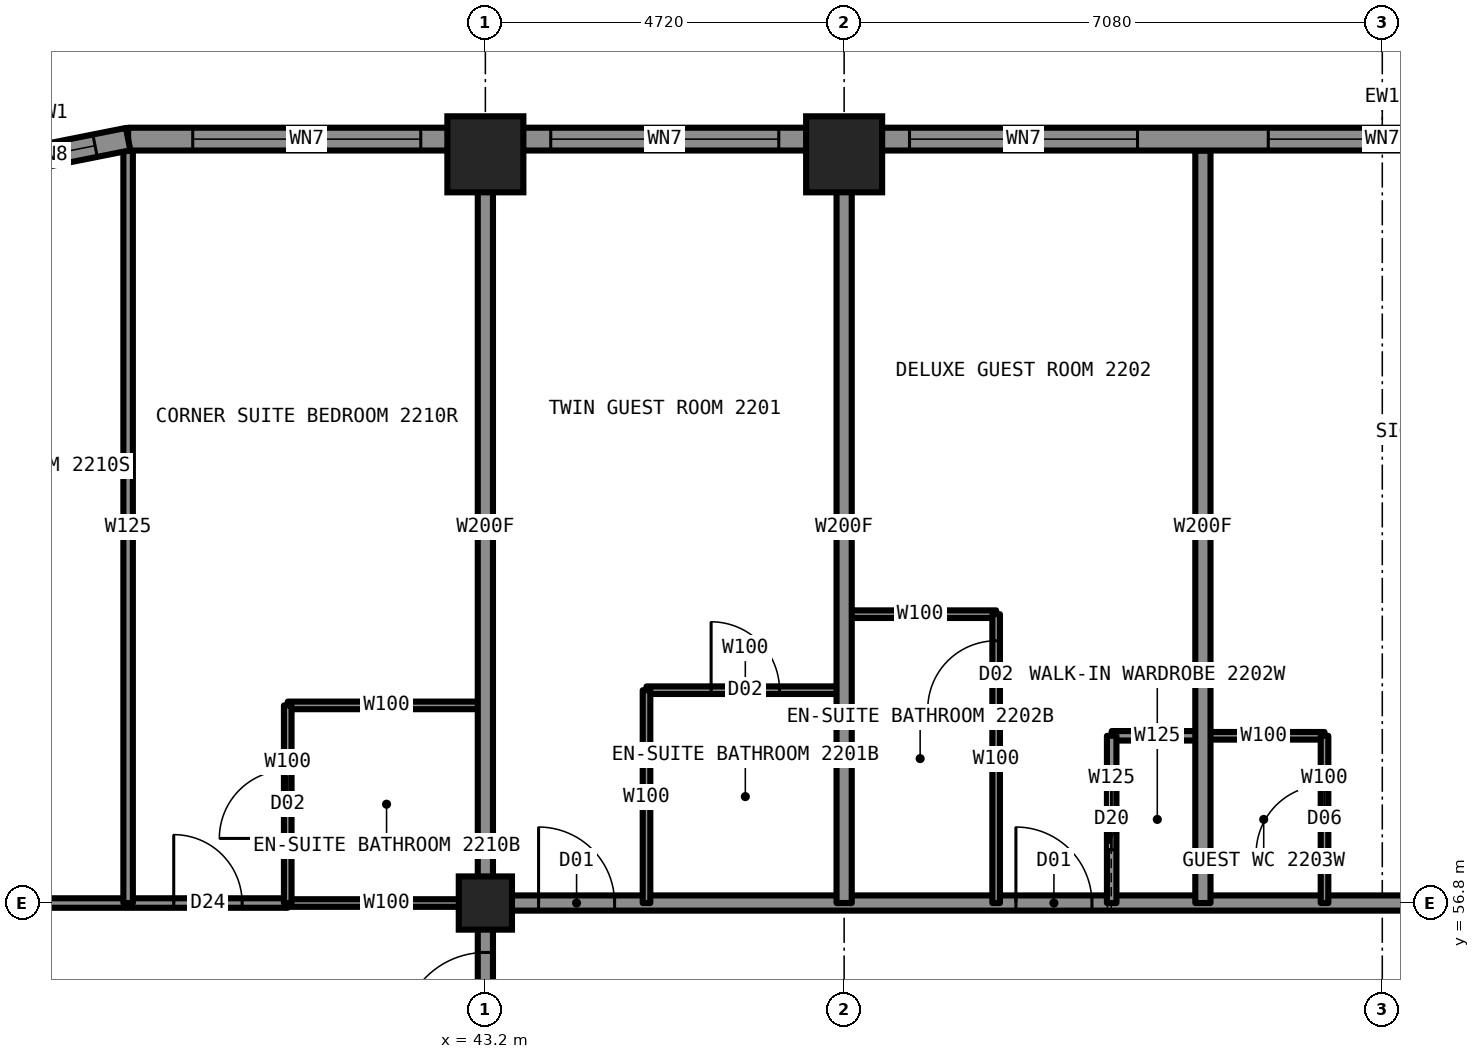
"""IFC4 building model, lengths in metres.
Left out: names, types, materials, properties, quantities, classifications, styles, units other than length and angle.
Written with IfcOpenShell. Run it as: python <this file> out.ifc"""

import sys

from ifc_helpers import new_model, si_unit, direction, frame, frame_2d, origin, origin_2d, place, context, subcontext, project, spatial, rectangle, hollow_rectangle, i_section, extrude, element, fill, save


model = new_model("IFC4")
c1 = context("Model", 3, precision=1e-05, world=origin(), true_north=direction((0.0, 1.0)))
c2 = subcontext(c1, "Body", "Model", "MODEL_VIEW")
j1 = project(units=[si_unit("LENGTHUNIT", "METRE"), si_unit("PLANEANGLEUNIT", "RADIAN")], contexts=[c1])
p1 = place(None, origin())
s1 = spatial("IfcSite", under=j1, at=p1, CompositionType="ELEMENT")
p2 = place(p1, origin())
s2 = spatial("IfcBuilding", under=s1, at=p2, CompositionType="ELEMENT")
p3 = place(p2, frame((0.0, 0.0, 81.0)))
s3 = spatial("IfcBuildingStorey", under=s2, at=p3, CompositionType="ELEMENT", Elevation=81.0)
for number, where, z_axis, x_axis in (
    (1, (43.2, 66.65, 0.0), (0.0, 0.0, 1.0), (1.0, 0.0, 0.0)),
    (2, (47.92, 66.65, 0.0), (0.0, 0.0, 1.0), (1.0, 0.0, 0.0)),
):
    element("IfcColumn", number, at=place(p3, frame(where, z_axis=z_axis, x_axis=x_axis)), inside=s3, PredefinedType="COLUMN", context=c2, shape_type="SweptSolid", body=[
        extrude(i_section(OverallWidth=0.432, OverallDepth=0.498, WebThickness=0.056, FlangeThickness=0.089, at=origin_2d()), origin(), (0.0, 0.0, 1.0), 3.5),
    ])
p4 = place(p3, frame((43.2, 56.8, 0.0), z_axis=(0.0, 0.0, 1.0), x_axis=(1.0, 0.0, 0.0)))
e3 = element("IfcColumn", 3, at=p4, inside=s3, PredefinedType="COLUMN", context=c2, shape_type="SweptSolid", body=[
    extrude(hollow_rectangle(XDim=0.7, YDim=0.7, WallThickness=0.06, at=origin_2d()), origin(), (0.0, 0.0, 1.0), 3.5),
])
p5 = place(p3, frame((40.6, 56.8, 0.0), z_axis=(0.0, 0.0, 1.0), x_axis=(1.0, 0.0, 0.0)))
e4 = element("IfcWall", 4, at=p5, inside=s3, PredefinedType="PARTITIONING", context=c2, shape_type="SweptSolid", body=[
    extrude(rectangle(XDim=2.6, YDim=0.1, at=frame_2d((1.3, 0.0))), origin(), (0.0, 0.0, 1.0), 2.573),
])
p6 = place(p3, frame((43.2, 56.8, 0.0), z_axis=(0.0, 0.0, 1.0), x_axis=(1.0, 0.0, 0.0)))
e5 = element("IfcWall", 5, at=p6, inside=s3, PredefinedType="PARTITIONING", context=c2, shape_type="SweptSolid", body=[
    extrude(rectangle(XDim=23.6, YDim=0.2, at=frame_2d((11.8, 0.0))), origin(), (0.0, 0.0, 1.0), 3.33),
])
p7 = place(p6, frame((0.7, 0.0, 0.0)))
e6 = element("IfcOpeningElement", 6, at=p7, cuts=e5, PredefinedType="OPENING", context=c2, shape_type="SweptSolid", body=[
    extrude(rectangle(XDim=1.0, YDim=2.2, at=frame_2d((0.5, 1.1))), frame((0.0, 0.11, 0.0), z_axis=(0.0, -1.0, 0.0), x_axis=(1.0, 0.0, 0.0)), (0.0, 0.0, 1.0), 0.22),
])
p8 = place(p6, frame((6.98, 0.0, 0.0)))
e7 = element("IfcOpeningElement", 7, at=p8, cuts=e5, PredefinedType="OPENING", context=c2, shape_type="SweptSolid", body=[
    extrude(rectangle(XDim=1.0, YDim=2.2, at=frame_2d((0.5, 1.1))), frame((0.0, 0.11, 0.0), z_axis=(0.0, -1.0, 0.0), x_axis=(1.0, 0.0, 0.0)), (0.0, 0.0, 1.0), 0.22),
])
p9 = place(p6, frame((11.29, 0.0, 0.0)))
e8 = element("IfcOpeningElement", 8, at=p9, cuts=e5, PredefinedType="OPENING", context=c2, shape_type="SweptSolid", body=[
    extrude(rectangle(XDim=1.1, YDim=2.2, at=frame_2d((0.55, 1.1))), frame((0.0, 0.11, 0.0), z_axis=(0.0, -1.0, 0.0), x_axis=(1.0, 0.0, 0.0)), (0.0, 0.0, 1.0), 0.22),
])
p10 = place(p3, frame((33.3, 56.8, 0.0), z_axis=(0.0, 0.0, 1.0), x_axis=(1.0, 0.0, 0.0)))
e9 = element("IfcWall", 9, at=p10, inside=s3, PredefinedType="PARTITIONING", context=c2, shape_type="SweptSolid", body=[
    extrude(rectangle(XDim=7.3, YDim=0.125, at=frame_2d((3.65, 0.0))), origin(), (0.0, 0.0, 1.0), 2.573),
])
p11 = place(p10, frame((5.8, 0.0, 0.0)))
e10 = element("IfcOpeningElement", 10, at=p11, cuts=e9, PredefinedType="OPENING", context=c2, shape_type="SweptSolid", body=[
    extrude(rectangle(XDim=0.9, YDim=2.2, at=frame_2d((0.45, 1.1))), frame((0.0, 0.073, 0.0), z_axis=(0.0, -1.0, 0.0), x_axis=(1.0, 0.0, 0.0)), (0.0, 0.0, 1.0), 0.145),
])
p12 = place(p10, frame((2.0, 0.0, 0.0)))
e11 = element("IfcOpeningElement", 11, at=p12, cuts=e9, PredefinedType="OPENING", context=c2, shape_type="SweptSolid", body=[
    extrude(rectangle(XDim=0.9, YDim=2.2, at=frame_2d((0.45, 1.1))), frame((0.0, 0.073, 0.0), z_axis=(0.0, -1.0, 0.0), x_axis=(1.0, 0.0, 0.0)), (0.0, 0.0, 1.0), 0.145),
])
p13 = place(p3, frame((52.64, 59.0, 0.0), z_axis=(0.0, 0.0, 1.0), x_axis=(1.0, 0.0, 0.0)))
e12 = element("IfcWall", 12, at=p13, inside=s3, PredefinedType="PARTITIONING", context=c2, shape_type="SweptSolid", body=[
    extrude(rectangle(XDim=1.6, YDim=0.1, at=frame_2d((0.8, 0.0))), origin(), (0.0, 0.0, 1.0), 3.33),
])
p14 = place(p3, frame((51.44, 59.0, 0.0), z_axis=(0.0, 0.0, 1.0), x_axis=(1.0, 0.0, 0.0)))
e13 = element("IfcWall", 13, at=p14, inside=s3, PredefinedType="PARTITIONING", context=c2, shape_type="SweptSolid", body=[
    extrude(rectangle(XDim=1.2, YDim=0.125, at=frame_2d((0.6, 0.0))), origin(), (0.0, 0.0, 1.0), 3.33),
])
p15 = place(p3, frame((40.6, 59.4, 0.0), z_axis=(0.0, 0.0, 1.0), x_axis=(1.0, 0.0, 0.0)))
e14 = element("IfcWall", 14, at=p15, inside=s3, PredefinedType="PARTITIONING", context=c2, shape_type="SweptSolid", body=[
    extrude(rectangle(XDim=2.6, YDim=0.1, at=frame_2d((1.3, 0.0))), origin(), (0.0, 0.0, 1.0), 3.33),
])
p16 = place(p3, frame((45.32, 59.6, 0.0), z_axis=(0.0, 0.0, 1.0), x_axis=(1.0, 0.0, 0.0)))
e15 = element("IfcWall", 15, at=p16, inside=s3, PredefinedType="PARTITIONING", context=c2, shape_type="SweptSolid", body=[
    extrude(rectangle(XDim=2.6, YDim=0.1, at=frame_2d((1.3, 0.0))), origin(), (0.0, 0.0, 1.0), 3.33),
])
p17 = place(p16, frame((0.85, 0.0, 0.0)))
e16 = element("IfcOpeningElement", 16, at=p17, cuts=e15, PredefinedType="OPENING", context=c2, shape_type="SweptSolid", body=[
    extrude(rectangle(XDim=0.9, YDim=2.1, at=frame_2d((0.45, 1.05))), frame((0.0, 0.06, 0.0), z_axis=(0.0, -1.0, 0.0), x_axis=(1.0, 0.0, 0.0)), (0.0, 0.0, 1.0), 0.12),
])
p18 = place(p3, frame((47.92, 60.6, 0.0), z_axis=(0.0, 0.0, 1.0), x_axis=(1.0, 0.0, 0.0)))
e17 = element("IfcWall", 17, at=p18, inside=s3, PredefinedType="PARTITIONING", context=c2, shape_type="SweptSolid", body=[
    extrude(rectangle(XDim=2.0, YDim=0.1, at=frame_2d((1.0, 0.0))), origin(), (0.0, 0.0, 1.0), 3.33),
])
p19 = place(p3, frame((54.24, 56.8, 0.0), z_axis=(0.0, 0.0, 1.0), x_axis=(0.0, 1.0, 0.0)))
e18 = element("IfcWall", 18, at=p19, inside=s3, PredefinedType="PARTITIONING", context=c2, shape_type="SweptSolid", body=[
    extrude(rectangle(XDim=2.2, YDim=0.1, at=frame_2d((1.1, 0.0))), origin(), (0.0, 0.0, 1.0), 3.33),
])
p20 = place(p19, frame((0.65, 0.0, 0.0)))
e19 = element("IfcOpeningElement", 19, at=p20, cuts=e18, PredefinedType="OPENING", context=c2, shape_type="SweptSolid", body=[
    extrude(rectangle(XDim=0.9, YDim=2.1, at=frame_2d((0.45, 1.05))), frame((0.0, 0.06, 0.0), z_axis=(0.0, -1.0, 0.0), x_axis=(1.0, 0.0, 0.0)), (0.0, 0.0, 1.0), 0.12),
])
p21 = place(p3, frame((43.2, 52.08, 0.0), z_axis=(0.0, 0.0, 1.0), x_axis=(0.0, 1.0, 0.0)))
e20 = element("IfcWall", 20, at=p21, inside=s3, PredefinedType="PARTITIONING", context=c2, shape_type="SweptSolid", body=[
    extrude(rectangle(XDim=4.72, YDim=0.2, at=frame_2d((2.36, 0.0))), origin(), (0.0, 0.0, 1.0), 3.33),
])
p22 = place(p21, frame((2.97, 0.0, 0.0)))
e21 = element("IfcOpeningElement", 21, at=p22, cuts=e20, PredefinedType="OPENING", context=c2, shape_type="SweptSolid", body=[
    extrude(rectangle(XDim=1.1, YDim=2.2, at=frame_2d((0.55, 1.1))), frame((0.0, 0.11, 0.0), z_axis=(0.0, -1.0, 0.0), x_axis=(1.0, 0.0, 0.0)), (0.0, 0.0, 1.0), 0.22),
])
p23 = place(p3, frame((43.2, 56.8, 0.0), z_axis=(0.0, 0.0, 1.0), x_axis=(0.0, 1.0, 0.0)))
e22 = element("IfcWall", 22, at=p23, inside=s3, PredefinedType="PARTITIONING", context=c2, shape_type="SweptSolid", body=[
    extrude(rectangle(XDim=9.9, YDim=0.2, at=frame_2d((4.95, 0.0))), origin(), (0.0, 0.0, 1.0), 2.573),
])
p24 = place(p3, frame((40.6, 56.8, 0.0), z_axis=(0.0, 0.0, 1.0), x_axis=(0.0, 1.0, 0.0)))
e23 = element("IfcWall", 23, at=p24, inside=s3, PredefinedType="PARTITIONING", context=c2, shape_type="SweptSolid", body=[
    extrude(rectangle(XDim=2.6, YDim=0.1, at=frame_2d((1.3, 0.0))), origin(), (0.0, 0.0, 1.0), 3.33),
])
p25 = place(p24, frame((0.85, 0.0, 0.0)))
e24 = element("IfcOpeningElement", 24, at=p25, cuts=e23, PredefinedType="OPENING", context=c2, shape_type="SweptSolid", body=[
    extrude(rectangle(XDim=0.9, YDim=2.1, at=frame_2d((0.45, 1.05))), frame((0.0, 0.06, 0.0), z_axis=(0.0, -1.0, 0.0), x_axis=(1.0, 0.0, 0.0)), (0.0, 0.0, 1.0), 0.12),
])
p26 = place(p3, frame((38.5, 56.8, 0.0), z_axis=(0.0, 0.0, 1.0), x_axis=(0.0, 1.0, 0.0)))
e25 = element("IfcWall", 25, at=p26, inside=s3, PredefinedType="PARTITIONING", context=c2, shape_type="SweptSolid", body=[
    extrude(rectangle(XDim=9.894, YDim=0.125, at=frame_2d((4.947, 0.0))), origin(), (0.0, 0.0, 1.0), 3.33),
])
p27 = place(p3, frame((52.64, 56.8, 0.0), z_axis=(0.0, 0.0, 1.0), x_axis=(0.0, 1.0, 0.0)))
e26 = element("IfcWall", 26, at=p27, inside=s3, PredefinedType="PARTITIONING", context=c2, shape_type="SweptSolid", body=[
    extrude(rectangle(XDim=9.9, YDim=0.2, at=frame_2d((4.95, 0.0))), origin(), (0.0, 0.0, 1.0), 3.33),
])
p28 = place(p3, frame((51.44, 56.8, 0.0), z_axis=(0.0, 0.0, 1.0), x_axis=(0.0, 1.0, 0.0)))
e27 = element("IfcWall", 27, at=p28, inside=s3, PredefinedType="PARTITIONING", context=c2, shape_type="SweptSolid", body=[
    extrude(rectangle(XDim=2.2, YDim=0.125, at=frame_2d((1.1, 0.0))), origin(), (0.0, 0.0, 1.0), 3.33),
])
p29 = place(p28, frame((0.7, 0.0, 0.0)))
e28 = element("IfcOpeningElement", 28, at=p29, cuts=e27, PredefinedType="OPENING", context=c2, shape_type="SweptSolid", body=[
    extrude(rectangle(XDim=0.8, YDim=2.1, at=frame_2d((0.4, 1.05))), frame((0.0, 0.073, 0.0), z_axis=(0.0, -1.0, 0.0), x_axis=(1.0, 0.0, 0.0)), (0.0, 0.0, 1.0), 0.145),
])
p30 = place(p3, frame((49.92, 56.8, 0.0), z_axis=(0.0, 0.0, 1.0), x_axis=(0.0, 1.0, 0.0)))
e29 = element("IfcWall", 29, at=p30, inside=s3, PredefinedType="PARTITIONING", context=c2, shape_type="SweptSolid", body=[
    extrude(rectangle(XDim=3.8, YDim=0.1, at=frame_2d((1.9, 0.0))), origin(), (0.0, 0.0, 1.0), 3.33),
])
p31 = place(p30, frame((2.55, 0.0, 0.0)))
e30 = element("IfcOpeningElement", 30, at=p31, cuts=e29, PredefinedType="OPENING", context=c2, shape_type="SweptSolid", body=[
    extrude(rectangle(XDim=0.9, YDim=2.1, at=frame_2d((0.45, 1.05))), frame((0.0, 0.06, 0.0), z_axis=(0.0, -1.0, 0.0), x_axis=(1.0, 0.0, 0.0)), (0.0, 0.0, 1.0), 0.12),
])
p32 = place(p3, frame((47.92, 56.8, 0.0), z_axis=(0.0, 0.0, 1.0), x_axis=(0.0, 1.0, 0.0)))
e31 = element("IfcWall", 31, at=p32, inside=s3, PredefinedType="PARTITIONING", context=c2, shape_type="SweptSolid", body=[
    extrude(rectangle(XDim=9.9, YDim=0.2, at=frame_2d((4.95, 0.0))), origin(), (0.0, 0.0, 1.0), 2.573),
])
p33 = place(p3, frame((45.32, 56.8, 0.0), z_axis=(0.0, 0.0, 1.0), x_axis=(0.0, 1.0, 0.0)))
e32 = element("IfcWall", 32, at=p33, inside=s3, PredefinedType="PARTITIONING", context=c2, shape_type="SweptSolid", body=[
    extrude(rectangle(XDim=2.8, YDim=0.1, at=frame_2d((1.4, 0.0))), origin(), (0.0, 0.0, 1.0), 3.33),
])
p34 = place(p3, frame((71.5, 66.85, 0.0), z_axis=(0.0, 0.0, 1.0), x_axis=(-1.0, 0.0, 0.0)))
e33 = element("IfcWall", 33, at=p34, inside=s3, PredefinedType="SOLIDWALL", context=c2, shape_type="SweptSolid", body=[
    extrude(rectangle(XDim=33.0, YDim=0.3, at=frame_2d((16.5, 0.0))), origin(), (0.0, 0.0, 1.0), 2.63),
])
p35 = place(p34, frame((0.85, 0.0, 0.5)))
e34 = element("IfcOpeningElement", 34, at=p35, cuts=e33, PredefinedType="OPENING", context=c2, shape_type="SweptSolid", body=[
    extrude(rectangle(XDim=3.0, YDim=2.0, at=frame_2d((1.5, 1.0))), frame((0.0, 0.16, 0.0), z_axis=(0.0, -1.0, 0.0), x_axis=(1.0, 0.0, 0.0)), (0.0, 0.0, 1.0), 0.32),
])
p36 = place(p34, frame((5.56, 0.0, 0.5)))
e35 = element("IfcOpeningElement", 35, at=p36, cuts=e33, PredefinedType="OPENING", context=c2, shape_type="SweptSolid", body=[
    extrude(rectangle(XDim=3.0, YDim=2.0, at=frame_2d((1.5, 1.0))), frame((0.0, 0.16, 0.0), z_axis=(0.0, -1.0, 0.0), x_axis=(1.0, 0.0, 0.0)), (0.0, 0.0, 1.0), 0.32),
])
p37 = place(p34, frame((10.28, 0.0, 0.5)))
e36 = element("IfcOpeningElement", 36, at=p37, cuts=e33, PredefinedType="OPENING", context=c2, shape_type="SweptSolid", body=[
    extrude(rectangle(XDim=3.0, YDim=2.0, at=frame_2d((1.5, 1.0))), frame((0.0, 0.16, 0.0), z_axis=(0.0, -1.0, 0.0), x_axis=(1.0, 0.0, 0.0)), (0.0, 0.0, 1.0), 0.32),
])
p38 = place(p34, frame((15.0, 0.0, 0.5)))
e37 = element("IfcOpeningElement", 37, at=p38, cuts=e33, PredefinedType="OPENING", context=c2, shape_type="SweptSolid", body=[
    extrude(rectangle(XDim=3.0, YDim=2.0, at=frame_2d((1.5, 1.0))), frame((0.0, 0.16, 0.0), z_axis=(0.0, -1.0, 0.0), x_axis=(1.0, 0.0, 0.0)), (0.0, 0.0, 1.0), 0.32),
])
p39 = place(p34, frame((19.72, 0.0, 0.5)))
e38 = element("IfcOpeningElement", 38, at=p39, cuts=e33, PredefinedType="OPENING", context=c2, shape_type="SweptSolid", body=[
    extrude(rectangle(XDim=3.0, YDim=2.0, at=frame_2d((1.5, 1.0))), frame((0.0, 0.16, 0.0), z_axis=(0.0, -1.0, 0.0), x_axis=(1.0, 0.0, 0.0)), (0.0, 0.0, 1.0), 0.32),
])
p40 = place(p34, frame((24.44, 0.0, 0.5)))
e39 = element("IfcOpeningElement", 39, at=p40, cuts=e33, PredefinedType="OPENING", context=c2, shape_type="SweptSolid", body=[
    extrude(rectangle(XDim=3.0, YDim=2.0, at=frame_2d((1.5, 1.0))), frame((0.0, 0.16, 0.0), z_axis=(0.0, -1.0, 0.0), x_axis=(1.0, 0.0, 0.0)), (0.0, 0.0, 1.0), 0.32),
])
p41 = place(p34, frame((29.15, 0.0, 0.5)))
e40 = element("IfcOpeningElement", 40, at=p41, cuts=e33, PredefinedType="OPENING", context=c2, shape_type="SweptSolid", body=[
    extrude(rectangle(XDim=3.0, YDim=2.0, at=frame_2d((1.5, 1.0))), frame((0.0, 0.16, 0.0), z_axis=(0.0, -1.0, 0.0), x_axis=(1.0, 0.0, 0.0)), (0.0, 0.0, 1.0), 0.32),
])
p42 = place(p3, frame((38.5, 66.85, 0.0), z_axis=(0.0, 0.0, 1.0), x_axis=(-0.980787050784, -0.195081421501, 0.0)))
e41 = element("IfcWall", 41, at=p42, inside=s3, PredefinedType="SOLIDWALL", context=c2, shape_type="SweptSolid", body=[
    extrude(rectangle(XDim=2.087, YDim=0.3, at=frame_2d((1.044, 0.0))), origin(), (0.0, 0.0, 1.0), 3.33),
])
p43 = place(p42, frame((0.444, 0.0, 1.65)))
e42 = element("IfcOpeningElement", 42, at=p43, cuts=e41, PredefinedType="OPENING", context=c2, shape_type="SweptSolid", body=[
    extrude(rectangle(XDim=0.6, YDim=0.8, at=frame_2d((0.3, 0.4))), frame((0.0, 0.16, 0.0), z_axis=(0.0, -1.0, 0.0), x_axis=(1.0, 0.0, 0.0)), (0.0, 0.0, 1.0), 0.32),
])
p44 = place(p7, origin())
e43 = element("IfcDoor", 43, at=p44, inside=s3, OperationType="SINGLE_SWING_LEFT", PredefinedType="DOOR", context=c2, shape_type="SweptSolid", body=[
    extrude(rectangle(XDim=1.0, YDim=2.2, at=frame_2d((0.5, 1.1))), frame((0.0, 0.025, 0.0), z_axis=(0.0, -1.0, 0.0), x_axis=(1.0, 0.0, 0.0)), (0.0, 0.0, 1.0), 0.05),
])
fill(e6, e43)
p45 = place(p17, origin())
e44 = element("IfcDoor", 44, at=p45, inside=s3, OperationType="SINGLE_SWING_RIGHT", PredefinedType="DOOR", context=c2, shape_type="SweptSolid", body=[
    extrude(rectangle(XDim=0.9, YDim=2.1, at=frame_2d((0.45, 1.05))), frame((0.0, 0.025, 0.0), z_axis=(0.0, -1.0, 0.0), x_axis=(1.0, 0.0, 0.0)), (0.0, 0.0, 1.0), 0.05),
])
fill(e16, e44)
p46 = place(p8, origin())
e45 = element("IfcDoor", 45, at=p46, inside=s3, OperationType="SINGLE_SWING_LEFT", PredefinedType="DOOR", context=c2, shape_type="SweptSolid", body=[
    extrude(rectangle(XDim=1.0, YDim=2.2, at=frame_2d((0.5, 1.1))), frame((0.0, 0.025, 0.0), z_axis=(0.0, -1.0, 0.0), x_axis=(1.0, 0.0, 0.0)), (0.0, 0.0, 1.0), 0.05),
])
fill(e7, e45)
p47 = place(p31, origin())
e46 = element("IfcDoor", 46, at=p47, inside=s3, OperationType="SINGLE_SWING_RIGHT", PredefinedType="DOOR", context=c2, shape_type="SweptSolid", body=[
    extrude(rectangle(XDim=0.9, YDim=2.1, at=frame_2d((0.45, 1.05))), frame((0.0, 0.025, 0.0), z_axis=(0.0, -1.0, 0.0), x_axis=(1.0, 0.0, 0.0)), (0.0, 0.0, 1.0), 0.05),
])
fill(e30, e46)
p48 = place(p29, origin())
e47 = element("IfcDoor", 47, at=p48, inside=s3, OperationType="SLIDING_TO_LEFT", PredefinedType="DOOR", context=c2, shape_type="SweptSolid", body=[
    extrude(rectangle(XDim=0.8, YDim=2.1, at=frame_2d((0.4, 1.05))), frame((0.0, 0.025, 0.0), z_axis=(0.0, -1.0, 0.0), x_axis=(1.0, 0.0, 0.0)), (0.0, 0.0, 1.0), 0.05),
])
fill(e28, e47)
p49 = place(p9, origin())
e48 = element("IfcDoor", 48, at=p49, inside=s3, OperationType="SINGLE_SWING_LEFT", PredefinedType="DOOR", context=c2, shape_type="SweptSolid", body=[
    extrude(rectangle(XDim=1.1, YDim=2.2, at=frame_2d((0.55, 1.1))), frame((0.0, 0.025, 0.0), z_axis=(0.0, -1.0, 0.0), x_axis=(1.0, 0.0, 0.0)), (0.0, 0.0, 1.0), 0.05),
])
fill(e8, e48)
p50 = place(p20, origin())
e49 = element("IfcDoor", 49, at=p50, inside=s3, OperationType="SINGLE_SWING_LEFT", PredefinedType="DOOR", context=c2, shape_type="SweptSolid", body=[
    extrude(rectangle(XDim=0.9, YDim=2.1, at=frame_2d((0.45, 1.05))), frame((0.0, 0.025, 0.0), z_axis=(0.0, -1.0, 0.0), x_axis=(1.0, 0.0, 0.0)), (0.0, 0.0, 1.0), 0.05),
])
fill(e19, e49)
p51 = place(p22, origin())
e50 = element("IfcDoor", 50, at=p51, inside=s3, OperationType="SINGLE_SWING_LEFT", PredefinedType="DOOR", context=c2, shape_type="SweptSolid", body=[
    extrude(rectangle(XDim=1.1, YDim=2.2, at=frame_2d((0.55, 1.1))), frame((0.0, 0.025, 0.0), z_axis=(0.0, -1.0, 0.0), x_axis=(1.0, 0.0, 0.0)), (0.0, 0.0, 1.0), 0.05),
])
fill(e21, e50)
p52 = place(p25, origin())
e51 = element("IfcDoor", 51, at=p52, inside=s3, OperationType="SINGLE_SWING_RIGHT", PredefinedType="DOOR", context=c2, shape_type="SweptSolid", body=[
    extrude(rectangle(XDim=0.9, YDim=2.1, at=frame_2d((0.45, 1.05))), frame((0.0, 0.025, 0.0), z_axis=(0.0, -1.0, 0.0), x_axis=(1.0, 0.0, 0.0)), (0.0, 0.0, 1.0), 0.05),
])
fill(e24, e51)
p53 = place(p11, origin())
e52 = element("IfcDoor", 52, at=p53, inside=s3, OperationType="SINGLE_SWING_LEFT", PredefinedType="DOOR", context=c2, shape_type="SweptSolid", body=[
    extrude(rectangle(XDim=0.9, YDim=2.2, at=frame_2d((0.45, 1.1))), frame((0.0, 0.025, 0.0), z_axis=(0.0, -1.0, 0.0), x_axis=(1.0, 0.0, 0.0)), (0.0, 0.0, 1.0), 0.05),
])
fill(e10, e52)
p54 = place(p38, origin())
e53 = element("IfcWindow", 53, at=p54, inside=s3, PartitioningType="SINGLE_PANEL", PredefinedType="WINDOW", context=c2, shape_type="SweptSolid", body=[
    extrude(rectangle(XDim=3.0, YDim=2.0, at=frame_2d((1.5, 1.0))), frame((0.0, 0.03, 0.0), z_axis=(0.0, -1.0, 0.0), x_axis=(1.0, 0.0, 0.0)), (0.0, 0.0, 1.0), 0.06),
])
fill(e37, e53)
p55 = place(p39, origin())
e54 = element("IfcWindow", 54, at=p55, inside=s3, PartitioningType="SINGLE_PANEL", PredefinedType="WINDOW", context=c2, shape_type="SweptSolid", body=[
    extrude(rectangle(XDim=3.0, YDim=2.0, at=frame_2d((1.5, 1.0))), frame((0.0, 0.03, 0.0), z_axis=(0.0, -1.0, 0.0), x_axis=(1.0, 0.0, 0.0)), (0.0, 0.0, 1.0), 0.06),
])
fill(e38, e54)
p56 = place(p40, origin())
e55 = element("IfcWindow", 55, at=p56, inside=s3, PartitioningType="SINGLE_PANEL", PredefinedType="WINDOW", context=c2, shape_type="SweptSolid", body=[
    extrude(rectangle(XDim=3.0, YDim=2.0, at=frame_2d((1.5, 1.0))), frame((0.0, 0.03, 0.0), z_axis=(0.0, -1.0, 0.0), x_axis=(1.0, 0.0, 0.0)), (0.0, 0.0, 1.0), 0.06),
])
fill(e39, e55)
p57 = place(p41, origin())
e56 = element("IfcWindow", 56, at=p57, inside=s3, PartitioningType="SINGLE_PANEL", PredefinedType="WINDOW", context=c2, shape_type="SweptSolid", body=[
    extrude(rectangle(XDim=3.0, YDim=2.0, at=frame_2d((1.5, 1.0))), frame((0.0, 0.03, 0.0), z_axis=(0.0, -1.0, 0.0), x_axis=(1.0, 0.0, 0.0)), (0.0, 0.0, 1.0), 0.06),
])
fill(e40, e56)
p58 = place(p43, origin())
e57 = element("IfcWindow", 57, at=p58, inside=s3, PartitioningType="SINGLE_PANEL", PredefinedType="WINDOW", context=c2, shape_type="SweptSolid", body=[
    extrude(rectangle(XDim=0.6, YDim=0.8, at=frame_2d((0.3, 0.4))), frame((0.0, 0.03, 0.0), z_axis=(0.0, -1.0, 0.0), x_axis=(1.0, 0.0, 0.0)), (0.0, 0.0, 1.0), 0.06),
])
fill(e42, e57)
save(model, sys.argv[1])
